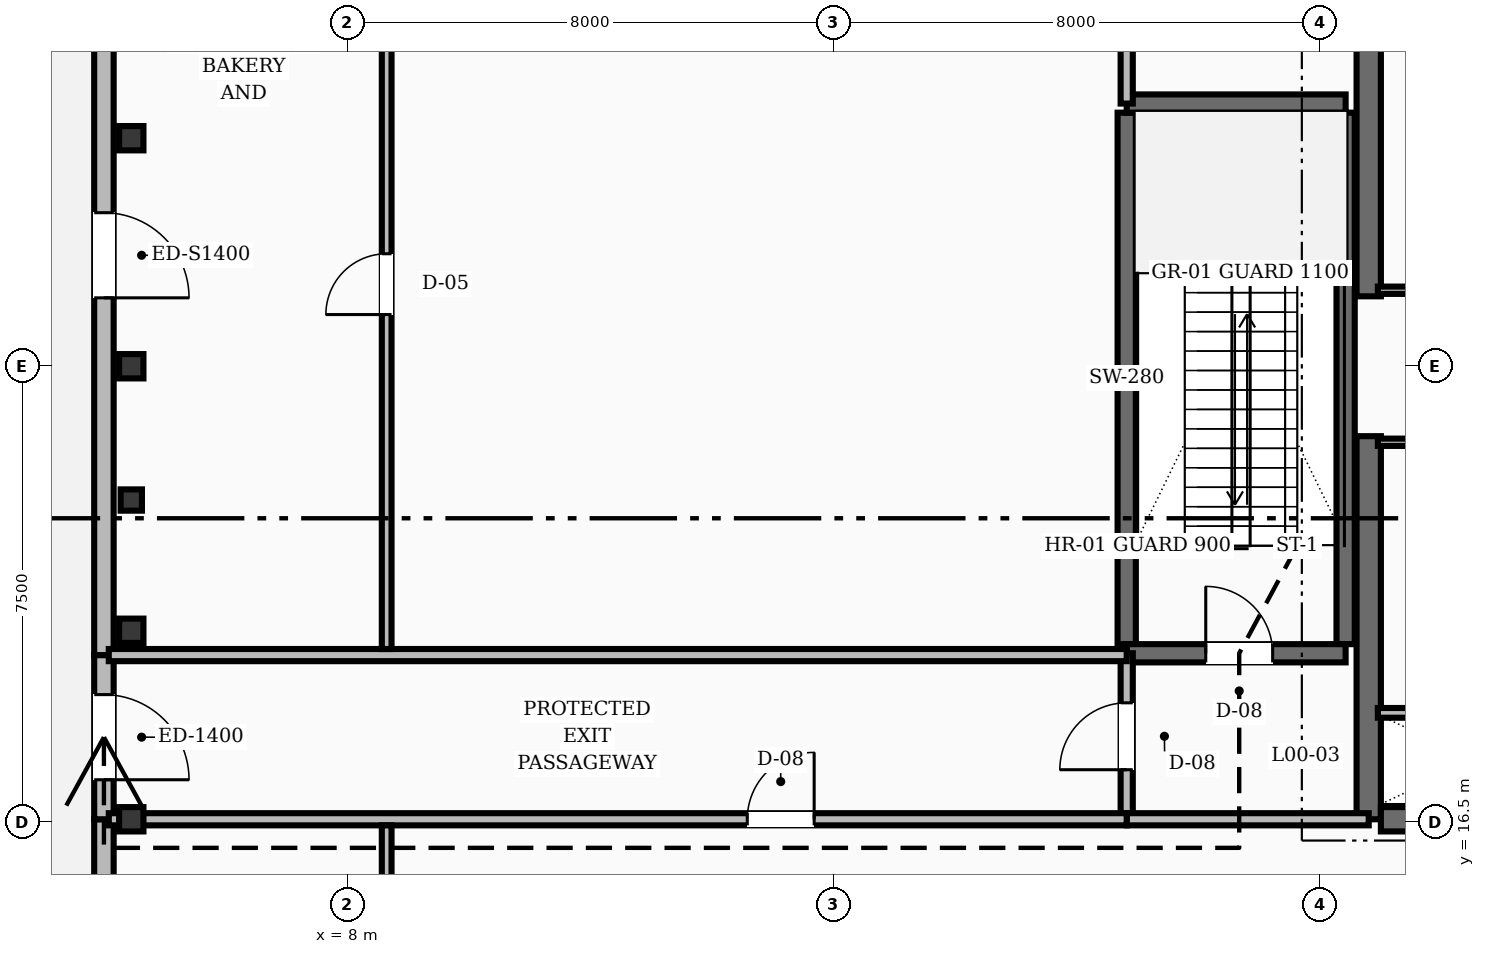
"""IFC4 building model, lengths in metres.
Left out: names, types, materials, properties, quantities, classifications, styles, units other than length and angle.
Written with IfcOpenShell. Run it as: python <this file> out.ifc"""

import sys

from ifc_helpers import new_model, si_unit, direction, frame, frame_2d, origin, origin_2d, place, context, subcontext, project, spatial, rectangle, hollow_rectangle, i_section, extrude, element, fill, save


model = new_model("IFC4")
c1 = context("Model", 3, precision=1e-05, world=origin(), true_north=direction((0.0, 1.0)))
c2 = subcontext(c1, "Body", "Model", "MODEL_VIEW")
j1 = project(units=[si_unit("LENGTHUNIT", "METRE"), si_unit("PLANEANGLEUNIT", "RADIAN")], contexts=[c1])
p1 = place(None, origin())
s1 = spatial("IfcSite", under=j1, at=p1, CompositionType="ELEMENT")
p2 = place(p1, origin())
s2 = spatial("IfcBuilding", under=s1, at=p2, CompositionType="ELEMENT")
p3 = place(p2, origin())
s3 = spatial("IfcBuildingStorey", under=s2, at=p3, CompositionType="ELEMENT", Elevation=0.0)
for number, where, z_axis, x_axis in (
    (1, (24.8, 16.55, 0.0), (0.0, 0.0, 1.0), (0.0, 1.0, 0.0)),
    (2, (24.8, 25.15, 0.0), (0.0, 0.0, 1.0), (0.0, 1.0, 0.0)),
):
    element("IfcWall", number, at=place(p3, frame(where, z_axis=z_axis, x_axis=x_axis)), inside=s3, PredefinedType="SHEAR", context=c2, shape_type="SweptSolid", body=[
        extrude(rectangle(XDim=6.3, YDim=0.4, at=frame_2d((3.15, 0.0))), origin(), (0.0, 0.0, 1.0), 5.2),
    ])
p4 = place(p3, frame((25.0, 16.55, 0.0), z_axis=(0.0, 0.0, 1.0), x_axis=(1.0, 0.0, 0.0)))
e3 = element("IfcWall", 3, at=p4, inside=s3, PredefinedType="SHEAR", context=c2, shape_type="SweptSolid", body=[
    extrude(rectangle(XDim=3.2, YDim=0.4, at=frame_2d((1.6, 0.0))), origin(), (0.0, 0.0, 1.0), 5.2),
])
for number, where, z_axis, x_axis in (
    (4, (20.82, 19.43, 0.0), (0.0, 0.0, 1.0), (0.0, 1.0, 0.0)),
    (5, (24.42, 19.43, 0.0), (0.0, 0.0, 1.0), (0.0, 1.0, 0.0)),
):
    element("IfcWall", number, at=place(p3, frame(where, z_axis=z_axis, x_axis=x_axis)), inside=s3, PredefinedType="SHEAR", context=c2, shape_type="SweptSolid", body=[
        extrude(rectangle(XDim=8.74, YDim=0.3, at=frame_2d((4.37, 0.0))), origin(), (0.0, 0.0, 1.0), 5.2),
    ])
p5 = place(p3, frame((20.82, 19.28, 0.0), z_axis=(0.0, 0.0, 1.0), x_axis=(1.0, 0.0, 0.0)))
e6 = element("IfcWall", 6, at=p5, inside=s3, PredefinedType="SHEAR", context=c2, shape_type="SweptSolid", body=[
    extrude(rectangle(XDim=3.6, YDim=0.3, at=frame_2d((1.8, 0.0))), origin(), (0.0, 0.0, 1.0), 5.2),
])
p6 = place(p5, frame((1.3, 0.0, 0.0)))
e7 = element("IfcOpeningElement", 7, at=p6, cuts=e6, PredefinedType="OPENING", context=c2, shape_type="SweptSolid", body=[
    extrude(rectangle(XDim=1.1, YDim=2.1, at=frame_2d((0.55, 1.05))), frame((0.0, 0.16, 0.0), z_axis=(0.0, -1.0, 0.0), x_axis=(1.0, 0.0, 0.0)), (0.0, 0.0, 1.0), 0.32),
])
p7 = place(p3, frame((20.82, 28.32, 0.0), z_axis=(0.0, 0.0, 1.0), x_axis=(1.0, 0.0, 0.0)))
e8 = element("IfcWall", 8, at=p7, inside=s3, PredefinedType="SHEAR", context=c2, shape_type="SweptSolid", body=[
    extrude(rectangle(XDim=3.6, YDim=0.3, at=frame_2d((1.8, 0.0))), origin(), (0.0, 0.0, 1.0), 5.2),
])
for number, where, z_axis, x_axis in (
    (9, (4.45, 16.55, 0.0), (0.0, 0.0, 1.0), (1.0, 0.0, 0.0)),
    (10, (4.45, 19.65, 0.0), (0.0, 0.0, 1.0), (1.0, 0.0, 0.0)),
    (11, (4.45, 24.0, 0.0), (0.0, 0.0, 1.0), (1.0, 0.0, 0.0)),
    (12, (4.45, 27.75, 0.0), (0.0, 0.0, 1.0), (1.0, 0.0, 0.0)),
):
    element("IfcColumn", number, at=place(p3, frame(where, z_axis=z_axis, x_axis=x_axis)), inside=s3, PredefinedType="COLUMN", context=c2, shape_type="SweptSolid", body=[
        extrude(i_section(OverallWidth=0.4, OverallDepth=0.4, WebThickness=0.013, FlangeThickness=0.021, FilletRadius=0.018, at=origin_2d()), origin(), (0.0, 0.0, 1.0), 5.2),
    ])
p8 = place(p3, frame((4.45, 21.8, 0.0), z_axis=(0.0, 0.0, 1.0), x_axis=(1.0, 0.0, 0.0)))
e13 = element("IfcColumn", 13, at=p8, inside=s3, PredefinedType="PILASTER", context=c2, shape_type="SweptSolid", body=[
    extrude(hollow_rectangle(XDim=0.35, YDim=0.35, WallThickness=0.016, at=origin_2d()), origin(), (0.0, 0.0, 1.0), 5.2),
])
p9 = place(p3, frame((4.0, 16.55, 0.0), z_axis=(0.0, 0.0, 1.0), x_axis=(0.0, -1.0, 0.0)))
e14 = element("IfcWall", 14, at=p9, inside=s3, PredefinedType="STANDARD", context=c2, shape_type="SweptSolid", body=[
    extrude(rectangle(XDim=4.4, YDim=0.32, at=frame_2d((2.2, 0.0))), origin(), (0.0, 0.0, 1.0), 3.97),
])
p10 = place(p3, frame((4.0, 19.25, 0.0), z_axis=(0.0, 0.0, 1.0), x_axis=(0.0, -1.0, 0.0)))
e15 = element("IfcWall", 15, at=p10, inside=s3, PredefinedType="STANDARD", context=c2, shape_type="SweptSolid", body=[
    extrude(rectangle(XDim=2.7, YDim=0.32, at=frame_2d((1.35, 0.0))), origin(), (0.0, 0.0, 1.0), 3.97),
])
p11 = place(p10, frame((0.65, 0.0, 0.0)))
e16 = element("IfcOpeningElement", 16, at=p11, cuts=e15, PredefinedType="OPENING", context=c2, shape_type="SweptSolid", body=[
    extrude(rectangle(XDim=1.4, YDim=2.2, at=frame_2d((0.7, 1.1))), frame((0.0, 0.17, 0.0), z_axis=(0.0, -1.0, 0.0), x_axis=(1.0, 0.0, 0.0)), (0.0, 0.0, 1.0), 0.34),
])
p12 = place(p3, frame((4.0, 32.4, 0.0), z_axis=(0.0, 0.0, 1.0), x_axis=(0.0, -1.0, 0.0)))
e17 = element("IfcWall", 17, at=p12, inside=s3, PredefinedType="STANDARD", context=c2, shape_type="SweptSolid", body=[
    extrude(rectangle(XDim=13.15, YDim=0.32, at=frame_2d((6.575, 0.0))), origin(), (0.0, 0.0, 1.0), 3.97),
])
p13 = place(p12, frame((5.875, 0.0, 0.0)))
e18 = element("IfcOpeningElement", 18, at=p13, cuts=e17, PredefinedType="OPENING", context=c2, shape_type="SweptSolid", body=[
    extrude(rectangle(XDim=1.4, YDim=2.25, at=frame_2d((0.7, 1.125))), frame((0.0, 0.17, 0.0), z_axis=(0.0, -1.0, 0.0), x_axis=(1.0, 0.0, 0.0)), (0.0, 0.0, 1.0), 0.34),
])
p14 = place(p3, frame((20.82, 16.55, 0.0), z_axis=(0.0, 0.0, 1.0), x_axis=(0.0, 1.0, 0.0)))
e19 = element("IfcWall", 19, at=p14, inside=s3, PredefinedType="SOLIDWALL", context=c2, shape_type="SweptSolid", body=[
    extrude(rectangle(XDim=2.73, YDim=0.2, at=frame_2d((1.365, 0.0))), origin(), (0.0, 0.0, 1.0), 3.92),
])
p15 = place(p14, frame((0.815, 0.0, 0.0)))
e20 = element("IfcOpeningElement", 20, at=p15, cuts=e19, PredefinedType="OPENING", context=c2, shape_type="SweptSolid", body=[
    extrude(rectangle(XDim=1.1, YDim=2.1, at=frame_2d((0.55, 1.05))), frame((0.0, 0.11, 0.0), z_axis=(0.0, -1.0, 0.0), x_axis=(1.0, 0.0, 0.0)), (0.0, 0.0, 1.0), 0.22),
])
p16 = place(p3, frame((20.82, 16.55, 0.0), z_axis=(0.0, 0.0, 1.0), x_axis=(1.0, 0.0, 0.0)))
e21 = element("IfcWall", 21, at=p16, inside=s3, PredefinedType="SOLIDWALL", context=c2, shape_type="SweptSolid", body=[
    extrude(rectangle(XDim=3.98, YDim=0.2, at=frame_2d((1.99, 0.0))), origin(), (0.0, 0.0, 1.0), 3.92),
])
p17 = place(p3, frame((20.82, 28.32, 0.0), z_axis=(0.0, 0.0, 1.0), x_axis=(0.0, 1.0, 0.0)))
e22 = element("IfcWall", 22, at=p17, inside=s3, PredefinedType="SOLIDWALL", context=c2, shape_type="SweptSolid", body=[
    extrude(rectangle(XDim=3.13, YDim=0.2, at=frame_2d((1.565, 0.0))), origin(), (0.0, 0.0, 1.0), 3.92),
])
p18 = place(p17, frame((1.09, 0.0, 0.0)))
e23 = element("IfcOpeningElement", 23, at=p18, cuts=e22, PredefinedType="OPENING", context=c2, shape_type="SweptSolid", body=[
    extrude(rectangle(XDim=0.95, YDim=2.1, at=frame_2d((0.475, 1.05))), frame((0.0, 0.11, 0.0), z_axis=(0.0, -1.0, 0.0), x_axis=(1.0, 0.0, 0.0)), (0.0, 0.0, 1.0), 0.22),
])
p19 = place(p3, frame((24.95, 18.3, 0.0), z_axis=(0.0, 0.0, 1.0), x_axis=(1.0, 0.0, 0.0)))
e24 = element("IfcWall", 24, at=p19, inside=s3, PredefinedType="SOLIDWALL", context=c2, shape_type="SweptSolid", body=[
    extrude(rectangle(XDim=3.2, YDim=0.16, at=frame_2d((1.6, 0.0))), origin(), (0.0, 0.0, 1.0), 3.92),
])
p20 = place(p3, frame((24.95, 25.25, 0.0), z_axis=(0.0, 0.0, 1.0), x_axis=(1.0, 0.0, 0.0)))
e25 = element("IfcWall", 25, at=p20, inside=s3, PredefinedType="PARTITIONING", context=c2, shape_type="SweptSolid", body=[
    extrude(rectangle(XDim=3.2, YDim=0.12, at=frame_2d((1.6, 0.0))), origin(), (0.0, 0.0, 1.0), 3.92),
])
p21 = place(p20, frame((1.125, 0.0, 0.0)))
e26 = element("IfcOpeningElement", 26, at=p21, cuts=e25, PredefinedType="OPENING", context=c2, shape_type="SweptSolid", body=[
    extrude(rectangle(XDim=0.95, YDim=2.1, at=frame_2d((0.475, 1.05))), frame((0.0, 0.07, 0.0), z_axis=(0.0, -1.0, 0.0), x_axis=(1.0, 0.0, 0.0)), (0.0, 0.0, 1.0), 0.14),
])
p22 = place(p3, frame((24.95, 22.75, 0.0), z_axis=(0.0, 0.0, 1.0), x_axis=(1.0, 0.0, 0.0)))
e27 = element("IfcWall", 27, at=p22, inside=s3, PredefinedType="PARTITIONING", context=c2, shape_type="SweptSolid", body=[
    extrude(rectangle(XDim=3.2, YDim=0.12, at=frame_2d((1.6, 0.0))), origin(), (0.0, 0.0, 1.0), 3.92),
])
p23 = place(p22, frame((1.125, 0.0, 0.0)))
e28 = element("IfcOpeningElement", 28, at=p23, cuts=e27, PredefinedType="OPENING", context=c2, shape_type="SweptSolid", body=[
    extrude(rectangle(XDim=0.95, YDim=2.1, at=frame_2d((0.475, 1.05))), frame((0.0, 0.07, 0.0), z_axis=(0.0, -1.0, 0.0), x_axis=(1.0, 0.0, 0.0)), (0.0, 0.0, 1.0), 0.14),
])
p24 = place(p3, frame((4.08, 16.55, 0.0), z_axis=(0.0, 0.0, 1.0), x_axis=(1.0, 0.0, 0.0)))
e29 = element("IfcWall", 29, at=p24, inside=s3, PredefinedType="SOLIDWALL", context=c2, shape_type="SweptSolid", body=[
    extrude(rectangle(XDim=16.74, YDim=0.2, at=frame_2d((8.37, 0.0))), origin(), (0.0, 0.0, 1.0), 3.92),
])
p25 = place(p24, frame((10.5, 0.0, 0.0)))
e30 = element("IfcOpeningElement", 30, at=p25, cuts=e29, PredefinedType="OPENING", context=c2, shape_type="SweptSolid", body=[
    extrude(rectangle(XDim=1.1, YDim=2.1, at=frame_2d((0.55, 1.05))), frame((0.0, 0.11, 0.0), z_axis=(0.0, -1.0, 0.0), x_axis=(1.0, 0.0, 0.0)), (0.0, 0.0, 1.0), 0.22),
])
p26 = place(p3, frame((4.08, 19.25, 0.0), z_axis=(0.0, 0.0, 1.0), x_axis=(1.0, 0.0, 0.0)))
e31 = element("IfcWall", 31, at=p26, inside=s3, PredefinedType="SOLIDWALL", context=c2, shape_type="SweptSolid", body=[
    extrude(rectangle(XDim=16.74, YDim=0.2, at=frame_2d((8.37, 0.0))), origin(), (0.0, 0.0, 1.0), 3.92),
])
p27 = place(p3, frame((8.65, 12.15, 0.0), z_axis=(0.0, 0.0, 1.0), x_axis=(0.0, 1.0, 0.0)))
e32 = element("IfcWall", 32, at=p27, inside=s3, PredefinedType="SOLIDWALL", context=c2, shape_type="SweptSolid", body=[
    extrude(rectangle(XDim=4.3, YDim=0.16, at=frame_2d((2.15, 0.0))), origin(), (0.0, 0.0, 1.0), 3.92),
])
p28 = place(p27, frame((1.6, 0.0, 0.0)))
e33 = element("IfcOpeningElement", 33, at=p28, cuts=e32, PredefinedType="OPENING", context=c2, shape_type="SweptSolid", body=[
    extrude(rectangle(XDim=1.0, YDim=2.1, at=frame_2d((0.5, 1.05))), frame((0.0, 0.09, 0.0), z_axis=(0.0, -1.0, 0.0), x_axis=(1.0, 0.0, 0.0)), (0.0, 0.0, 1.0), 0.18),
])
p29 = place(p3, frame((8.65, 19.35, 0.0), z_axis=(0.0, 0.0, 1.0), x_axis=(0.0, 1.0, 0.0)))
e34 = element("IfcWall", 34, at=p29, inside=s3, PredefinedType="SOLIDWALL", context=c2, shape_type="SweptSolid", body=[
    extrude(rectangle(XDim=13.05, YDim=0.16, at=frame_2d((6.525, 0.0))), origin(), (0.0, 0.0, 1.0), 3.92),
])
p30 = place(p29, frame((5.5, 0.0, 0.0)))
e35 = element("IfcOpeningElement", 35, at=p30, cuts=e34, PredefinedType="OPENING", context=c2, shape_type="SweptSolid", body=[
    extrude(rectangle(XDim=1.0, YDim=2.1, at=frame_2d((0.5, 1.05))), frame((0.0, 0.09, 0.0), z_axis=(0.0, -1.0, 0.0), x_axis=(1.0, 0.0, 0.0)), (0.0, 0.0, 1.0), 0.18),
])
p31 = place(p11, frame((1.4, 0.0, 0.0), z_axis=(0.0, 0.0, 1.0), x_axis=(-1.0, 0.0, 0.0)))
e36 = element("IfcDoor", 36, at=p31, inside=s3, OperationType="SINGLE_SWING_RIGHT", PredefinedType="DOOR", context=c2, shape_type="SweptSolid", body=[
    extrude(rectangle(XDim=1.4, YDim=2.2, at=frame_2d((0.7, 1.1))), frame((0.0, 0.025, 0.0), z_axis=(0.0, -1.0, 0.0), x_axis=(1.0, 0.0, 0.0)), (0.0, 0.0, 1.0), 0.05),
])
fill(e16, e36)
p32 = place(p13, frame((1.4, 0.0, 0.0), z_axis=(0.0, 0.0, 1.0), x_axis=(-1.0, 0.0, 0.0)))
e37 = element("IfcDoor", 37, at=p32, inside=s3, OperationType="SINGLE_SWING_RIGHT", PredefinedType="DOOR", context=c2, shape_type="SweptSolid", body=[
    extrude(rectangle(XDim=1.4, YDim=2.25, at=frame_2d((0.7, 1.125))), frame((0.0, 0.025, 0.0), z_axis=(0.0, -1.0, 0.0), x_axis=(1.0, 0.0, 0.0)), (0.0, 0.0, 1.0), 0.05),
])
fill(e18, e37)
p33 = place(p6, origin())
e38 = element("IfcDoor", 38, at=p33, inside=s3, OperationType="SINGLE_SWING_LEFT", PredefinedType="DOOR", context=c2, shape_type="SweptSolid", body=[
    extrude(rectangle(XDim=1.1, YDim=2.1, at=frame_2d((0.55, 1.05))), frame((0.0, 0.025, 0.0), z_axis=(0.0, -1.0, 0.0), x_axis=(1.0, 0.0, 0.0)), (0.0, 0.0, 1.0), 0.05),
])
fill(e7, e38)
p34 = place(p15, origin())
e39 = element("IfcDoor", 39, at=p34, inside=s3, OperationType="SINGLE_SWING_LEFT", PredefinedType="DOOR", context=c2, shape_type="SweptSolid", body=[
    extrude(rectangle(XDim=1.1, YDim=2.1, at=frame_2d((0.55, 1.05))), frame((0.0, 0.025, 0.0), z_axis=(0.0, -1.0, 0.0), x_axis=(1.0, 0.0, 0.0)), (0.0, 0.0, 1.0), 0.05),
])
fill(e20, e39)
p35 = place(p25, origin())
e40 = element("IfcDoor", 40, at=p35, inside=s3, OperationType="SINGLE_SWING_RIGHT", PredefinedType="DOOR", context=c2, shape_type="SweptSolid", body=[
    extrude(rectangle(XDim=1.1, YDim=2.1, at=frame_2d((0.55, 1.05))), frame((0.0, 0.025, 0.0), z_axis=(0.0, -1.0, 0.0), x_axis=(1.0, 0.0, 0.0)), (0.0, 0.0, 1.0), 0.05),
])
fill(e30, e40)
p36 = place(p30, origin())
e41 = element("IfcDoor", 41, at=p36, inside=s3, OperationType="SINGLE_SWING_LEFT", PredefinedType="DOOR", context=c2, shape_type="SweptSolid", body=[
    extrude(rectangle(XDim=1.0, YDim=2.1, at=frame_2d((0.5, 1.05))), frame((0.0, 0.025, 0.0), z_axis=(0.0, -1.0, 0.0), x_axis=(1.0, 0.0, 0.0)), (0.0, 0.0, 1.0), 0.05),
])
fill(e35, e41)
save(model, sys.argv[1])
